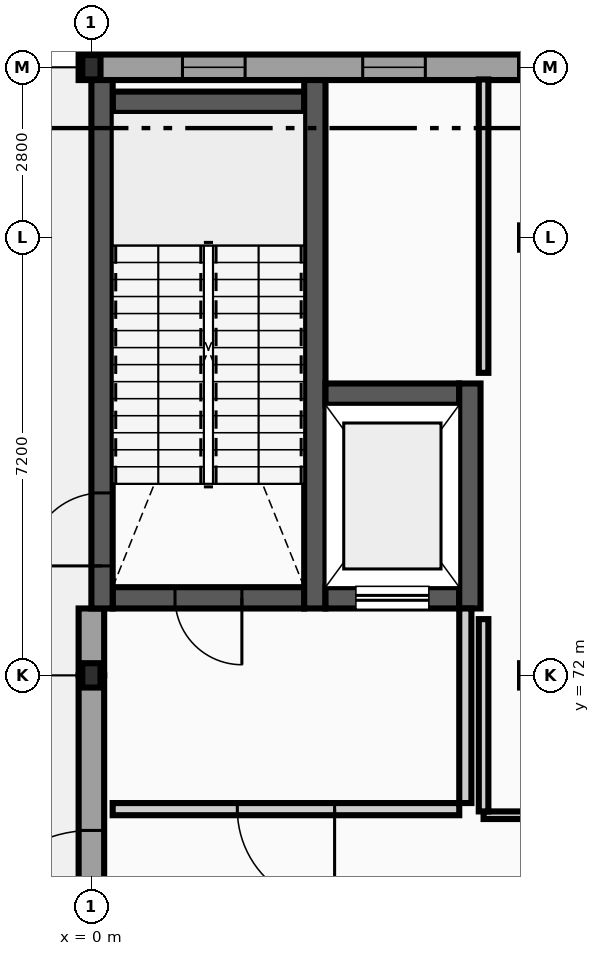
"""IFC4 building model, lengths in metres.
Left out: names, types, materials, properties, quantities, classifications, styles, units other than length and angle.
Written with IfcOpenShell. Run it as: python <this file> out.ifc"""

import sys

from ifc_helpers import new_model, si_unit, direction, frame, frame_2d, origin, origin_2d, place, context, subcontext, project, spatial, rectangle, i_section, extrude, element, fill, save


model = new_model("IFC4")
c1 = context("Model", 3, precision=1e-05, world=origin(), true_north=direction((0.0, 1.0)))
c2 = subcontext(c1, "Body", "Model", "MODEL_VIEW")
j1 = project(units=[si_unit("LENGTHUNIT", "METRE"), si_unit("PLANEANGLEUNIT", "RADIAN")], contexts=[c1])
p1 = place(None, origin())
s1 = spatial("IfcSite", under=j1, at=p1, CompositionType="ELEMENT")
p2 = place(p1, origin())
s2 = spatial("IfcBuilding", under=s1, at=p2, CompositionType="ELEMENT")
p3 = place(p2, origin())
s3 = spatial("IfcBuildingStorey", under=s2, at=p3, CompositionType="ELEMENT", Elevation=0.0)
for number, where, z_axis, x_axis in (
    (1, (0.0, 72.0, 0.0), (0.0, 0.0, 1.0), (1.0, 0.0, 0.0)),
    (2, (0.0, 82.0, 0.0), (0.0, 0.0, 1.0), (1.0, 0.0, 0.0)),
    (3, (7.2, 72.0, 0.0), (0.0, 0.0, 1.0), (1.0, 0.0, 0.0)),
    (4, (7.2, 79.2, 0.0), (0.0, 0.0, 1.0), (1.0, 0.0, 0.0)),
    (5, (7.2, 82.0, 0.0), (0.0, 0.0, 1.0), (1.0, 0.0, 0.0)),
):
    element("IfcColumn", number, at=place(p3, frame(where, z_axis=z_axis, x_axis=x_axis)), inside=s3, PredefinedType="COLUMN", context=c2, shape_type="SweptSolid", body=[
        extrude(i_section(OverallWidth=0.3, OverallDepth=0.4, WebThickness=0.013, FlangeThickness=0.024, FilletRadius=0.027, at=origin_2d()), origin(), (0.0, 0.0, 1.0), 5.2),
    ])
p4 = place(p3, frame((7.2, 82.0, 0.0), z_axis=(0.0, 0.0, 1.0), x_axis=(-1.0, 0.0, 0.0)))
e6 = element("IfcWall", 6, at=p4, inside=s3, PredefinedType="STANDARD", context=c2, shape_type="SweptSolid", body=[
    extrude(rectangle(XDim=7.41, YDim=0.42, at=frame_2d((3.705, 0.0))), origin(), (0.0, 0.0, 1.0), 4.635),
])
p5 = place(p4, frame((1.708, 0.0, 0.95)))
e7 = element("IfcOpeningElement", 7, at=p5, cuts=e6, PredefinedType="OPENING", context=c2, shape_type="SweptSolid", body=[
    extrude(rectangle(XDim=1.03, YDim=1.404, at=frame_2d((0.515, 0.702))), frame((0.0, 0.22, 0.0), z_axis=(0.0, -1.0, 0.0), x_axis=(1.0, 0.0, 0.0)), (0.0, 0.0, 1.0), 0.44),
])
p6 = place(p4, frame((4.672, 0.0, 0.95)))
e8 = element("IfcOpeningElement", 8, at=p6, cuts=e6, PredefinedType="OPENING", context=c2, shape_type="SweptSolid", body=[
    extrude(rectangle(XDim=1.03, YDim=1.404, at=frame_2d((0.515, 0.702))), frame((0.0, 0.22, 0.0), z_axis=(0.0, -1.0, 0.0), x_axis=(1.0, 0.0, 0.0)), (0.0, 0.0, 1.0), 0.44),
])
p7 = place(p3, frame((0.0, 72.0, 0.0), z_axis=(0.0, 0.0, 1.0), x_axis=(0.0, -1.0, 0.0)))
e9 = element("IfcWall", 9, at=p7, inside=s3, PredefinedType="STANDARD", context=c2, shape_type="SweptSolid", body=[
    extrude(rectangle(XDim=7.2, YDim=0.42, at=frame_2d((3.6, 0.0))), origin(), (0.0, 0.0, 1.0), 4.565),
])
p8 = place(p7, frame((2.55, 0.0, 0.0)))
e10 = element("IfcOpeningElement", 10, at=p8, cuts=e9, PredefinedType="OPENING", context=c2, shape_type="SweptSolid", body=[
    extrude(rectangle(XDim=2.1, YDim=2.4, at=frame_2d((1.05, 1.2))), frame((0.0, 0.22, 0.0), z_axis=(0.0, -1.0, 0.0), x_axis=(1.0, 0.0, 0.0)), (0.0, 0.0, 1.0), 0.44),
])
p9 = place(p3, frame((0.0, 73.1, 0.0), z_axis=(0.0, 0.0, 1.0), x_axis=(0.0, -1.0, 0.0)))
e11 = element("IfcWall", 11, at=p9, inside=s3, PredefinedType="STANDARD", context=c2, shape_type="SweptSolid", body=[
    extrude(rectangle(XDim=1.1, YDim=0.42, at=frame_2d((0.55, 0.0))), origin(), (0.0, 0.0, 1.0), 4.94),
])
p10 = place(p3, frame((0.35, 73.275, 0.0), z_axis=(0.0, 0.0, 1.0), x_axis=(1.0, 0.0, 0.0)))
e12 = element("IfcWall", 12, at=p10, inside=s3, PredefinedType="SHEAR", context=c2, shape_type="SweptSolid", body=[
    extrude(rectangle(XDim=3.15, YDim=0.35, at=frame_2d((1.575, 0.0))), origin(), (0.0, 0.0, 1.0), 4.94),
])
p11 = place(p10, frame((1.025, 0.0, 0.0)))
e13 = element("IfcOpeningElement", 13, at=p11, cuts=e12, PredefinedType="OPENING", context=c2, shape_type="SweptSolid", body=[
    extrude(rectangle(XDim=1.1, YDim=2.15, at=frame_2d((0.55, 1.075))), frame((0.0, 0.185, 0.0), z_axis=(0.0, -1.0, 0.0), x_axis=(1.0, 0.0, 0.0)), (0.0, 0.0, 1.0), 0.37),
])
p12 = place(p3, frame((0.35, 81.425, 0.0), z_axis=(0.0, 0.0, 1.0), x_axis=(1.0, 0.0, 0.0)))
e14 = element("IfcWall", 14, at=p12, inside=s3, PredefinedType="SHEAR", context=c2, shape_type="SweptSolid", body=[
    extrude(rectangle(XDim=3.15, YDim=0.35, at=frame_2d((1.575, 0.0))), origin(), (0.0, 0.0, 1.0), 4.94),
])
p13 = place(p3, frame((0.175, 73.1, 0.0), z_axis=(0.0, 0.0, 1.0), x_axis=(0.0, 1.0, 0.0)))
e15 = element("IfcWall", 15, at=p13, inside=s3, PredefinedType="SHEAR", context=c2, shape_type="SweptSolid", body=[
    extrude(rectangle(XDim=8.69, YDim=0.35, at=frame_2d((4.345, 0.0))), origin(), (0.0, 0.0, 1.0), 4.94),
])
p14 = place(p13, frame((0.7, 0.0, 0.0)))
e16 = element("IfcOpeningElement", 16, at=p14, cuts=e15, PredefinedType="OPENING", context=c2, shape_type="SweptSolid", body=[
    extrude(rectangle(XDim=1.2, YDim=2.15, at=frame_2d((0.6, 1.075))), frame((0.0, 0.185, 0.0), z_axis=(0.0, -1.0, 0.0), x_axis=(1.0, 0.0, 0.0)), (0.0, 0.0, 1.0), 0.37),
])
p15 = place(p3, frame((3.675, 73.1, 0.0), z_axis=(0.0, 0.0, 1.0), x_axis=(0.0, 1.0, 0.0)))
e17 = element("IfcWall", 17, at=p15, inside=s3, PredefinedType="SHEAR", context=c2, shape_type="SweptSolid", body=[
    extrude(rectangle(XDim=8.69, YDim=0.35, at=frame_2d((4.345, 0.0))), origin(), (0.0, 0.0, 1.0), 4.94),
])
p16 = place(p3, frame((3.85, 73.275, 0.0), z_axis=(0.0, 0.0, 1.0), x_axis=(1.0, 0.0, 0.0)))
e18 = element("IfcWall", 18, at=p16, inside=s3, PredefinedType="SHEAR", context=c2, shape_type="SweptSolid", body=[
    extrude(rectangle(XDim=2.2, YDim=0.35, at=frame_2d((1.1, 0.0))), origin(), (0.0, 0.0, 1.0), 4.94),
])
p17 = place(p16, frame((0.5, 0.0, 0.0)))
e19 = element("IfcOpeningElement", 19, at=p17, cuts=e18, PredefinedType="OPENING", context=c2, shape_type="SweptSolid", body=[
    extrude(rectangle(XDim=1.2, YDim=2.2, at=frame_2d((0.6, 1.1))), frame((0.0, 0.185, 0.0), z_axis=(0.0, -1.0, 0.0), x_axis=(1.0, 0.0, 0.0)), (0.0, 0.0, 1.0), 0.37),
])
p18 = place(p3, frame((3.85, 76.625, 0.0), z_axis=(0.0, 0.0, 1.0), x_axis=(1.0, 0.0, 0.0)))
e20 = element("IfcWall", 20, at=p18, inside=s3, PredefinedType="SHEAR", context=c2, shape_type="SweptSolid", body=[
    extrude(rectangle(XDim=2.2, YDim=0.35, at=frame_2d((1.1, 0.0))), origin(), (0.0, 0.0, 1.0), 4.94),
])
p19 = place(p3, frame((6.225, 73.1, 0.0), z_axis=(0.0, 0.0, 1.0), x_axis=(0.0, 1.0, 0.0)))
e21 = element("IfcWall", 21, at=p19, inside=s3, PredefinedType="SHEAR", context=c2, shape_type="SweptSolid", body=[
    extrude(rectangle(XDim=3.7, YDim=0.35, at=frame_2d((1.85, 0.0))), origin(), (0.0, 0.0, 1.0), 4.94),
])
p20 = place(p3, frame((0.35, 69.8, 0.0), z_axis=(0.0, 0.0, 1.0), x_axis=(1.0, 0.0, 0.0)))
e22 = element("IfcWall", 22, at=p20, inside=s3, PredefinedType="PARTITIONING", context=c2, shape_type="SweptSolid", body=[
    extrude(rectangle(XDim=5.7, YDim=0.2, at=frame_2d((2.85, 0.0))), origin(), (0.0, 0.0, 1.0), 4.94),
])
p21 = place(p20, frame((2.05, 0.0, 0.0)))
e23 = element("IfcOpeningElement", 23, at=p21, cuts=e22, PredefinedType="OPENING", context=c2, shape_type="SweptSolid", body=[
    extrude(rectangle(XDim=1.6, YDim=2.2, at=frame_2d((0.8, 1.1))), frame((0.0, 0.11, 0.0), z_axis=(0.0, -1.0, 0.0), x_axis=(1.0, 0.0, 0.0)), (0.0, 0.0, 1.0), 0.22),
])
p22 = place(p3, frame((6.15, 69.9, 0.0), z_axis=(0.0, 0.0, 1.0), x_axis=(0.0, 1.0, 0.0)))
e24 = element("IfcWall", 24, at=p22, inside=s3, PredefinedType="PARTITIONING", context=c2, shape_type="SweptSolid", body=[
    extrude(rectangle(XDim=3.2, YDim=0.2, at=frame_2d((1.6, 0.0))), origin(), (0.0, 0.0, 1.0), 4.94),
])
p23 = place(p3, frame((6.45, 69.7, 0.0), z_axis=(0.0, 0.0, 1.0), x_axis=(1.0, 0.0, 0.0)))
e25 = element("IfcWall", 25, at=p23, inside=s3, PredefinedType="PARTITIONING", context=c2, shape_type="SweptSolid", body=[
    extrude(rectangle(XDim=16.18, YDim=0.125, at=frame_2d((8.09, 0.0))), origin(), (0.0, 0.0, 1.0), 4.94),
])
p24 = place(p23, frame((12.35, 0.0, 0.0)))
e26 = element("IfcOpeningElement", 26, at=p24, cuts=e25, PredefinedType="OPENING", context=c2, shape_type="SweptSolid", body=[
    extrude(rectangle(XDim=0.9, YDim=2.1, at=frame_2d((0.45, 1.05))), frame((0.0, 0.073, 0.0), z_axis=(0.0, -1.0, 0.0), x_axis=(1.0, 0.0, 0.0)), (0.0, 0.0, 1.0), 0.145),
])
p25 = place(p23, frame((9.95, 0.0, 0.0)))
e27 = element("IfcOpeningElement", 27, at=p25, cuts=e25, PredefinedType="OPENING", context=c2, shape_type="SweptSolid", body=[
    extrude(rectangle(XDim=1.5, YDim=2.2, at=frame_2d((0.75, 1.1))), frame((0.0, 0.073, 0.0), z_axis=(0.0, -1.0, 0.0), x_axis=(1.0, 0.0, 0.0)), (0.0, 0.0, 1.0), 0.145),
])
p26 = place(p23, frame((2.625, 0.0, 0.0)))
e28 = element("IfcOpeningElement", 28, at=p26, cuts=e25, PredefinedType="OPENING", context=c2, shape_type="SweptSolid", body=[
    extrude(rectangle(XDim=1.5, YDim=2.2, at=frame_2d((0.75, 1.1))), frame((0.0, 0.073, 0.0), z_axis=(0.0, -1.0, 0.0), x_axis=(1.0, 0.0, 0.0)), (0.0, 0.0, 1.0), 0.145),
])
p27 = place(p3, frame((6.45, 69.762, 0.0), z_axis=(0.0, 0.0, 1.0), x_axis=(0.0, 1.0, 0.0)))
e29 = element("IfcWall", 29, at=p27, inside=s3, PredefinedType="PARTITIONING", context=c2, shape_type="SweptSolid", body=[
    extrude(rectangle(XDim=3.163, YDim=0.158, at=frame_2d((1.581, 0.0))), origin(), (0.0, 0.0, 1.0), 4.94),
])
p28 = place(p3, frame((6.45, 76.975, 0.0), z_axis=(0.0, 0.0, 1.0), x_axis=(0.0, 1.0, 0.0)))
e30 = element("IfcWall", 30, at=p28, inside=s3, PredefinedType="PARTITIONING", context=c2, shape_type="SweptSolid", body=[
    extrude(rectangle(XDim=4.825, YDim=0.158, at=frame_2d((2.413, 0.0))), origin(), (0.0, 0.0, 1.0), 4.94),
])
p29 = place(p5, origin())
e31 = element("IfcWindow", 31, at=p29, inside=s3, PartitioningType="SINGLE_PANEL", PredefinedType="WINDOW", context=c2, shape_type="SweptSolid", body=[
    extrude(rectangle(XDim=1.03, YDim=1.404, at=frame_2d((0.515, 0.702))), frame((0.0, 0.03, 0.0), z_axis=(0.0, -1.0, 0.0), x_axis=(1.0, 0.0, 0.0)), (0.0, 0.0, 1.0), 0.06),
])
fill(e7, e31)
p30 = place(p6, origin())
e32 = element("IfcWindow", 32, at=p30, inside=s3, PartitioningType="SINGLE_PANEL", PredefinedType="WINDOW", context=c2, shape_type="SweptSolid", body=[
    extrude(rectangle(XDim=1.03, YDim=1.404, at=frame_2d((0.515, 0.702))), frame((0.0, 0.03, 0.0), z_axis=(0.0, -1.0, 0.0), x_axis=(1.0, 0.0, 0.0)), (0.0, 0.0, 1.0), 0.06),
])
fill(e8, e32)
p31 = place(p8, origin())
e33 = element("IfcDoor", 33, at=p31, inside=s3, OperationType="DOUBLE_DOOR_SINGLE_SWING", PredefinedType="DOOR", context=c2, shape_type="SweptSolid", body=[
    extrude(rectangle(XDim=2.1, YDim=2.4, at=frame_2d((1.05, 1.2))), frame((0.0, 0.025, 0.0), z_axis=(0.0, -1.0, 0.0), x_axis=(1.0, 0.0, 0.0)), (0.0, 0.0, 1.0), 0.05),
])
fill(e10, e33)
p32 = place(p11, origin())
e34 = element("IfcDoor", 34, at=p32, inside=s3, OperationType="SINGLE_SWING_RIGHT", PredefinedType="DOOR", context=c2, shape_type="SweptSolid", body=[
    extrude(rectangle(XDim=1.1, YDim=2.15, at=frame_2d((0.55, 1.075))), frame((0.0, 0.025, 0.0), z_axis=(0.0, -1.0, 0.0), x_axis=(1.0, 0.0, 0.0)), (0.0, 0.0, 1.0), 0.05),
])
fill(e13, e34)
p33 = place(p14, origin())
e35 = element("IfcDoor", 35, at=p33, inside=s3, OperationType="SINGLE_SWING_LEFT", PredefinedType="DOOR", context=c2, shape_type="SweptSolid", body=[
    extrude(rectangle(XDim=1.2, YDim=2.15, at=frame_2d((0.6, 1.075))), frame((0.0, 0.025, 0.0), z_axis=(0.0, -1.0, 0.0), x_axis=(1.0, 0.0, 0.0)), (0.0, 0.0, 1.0), 0.05),
])
fill(e16, e35)
p34 = place(p17, origin())
e36 = element("IfcDoor", 36, at=p34, inside=s3, OperationType="SLIDING_TO_RIGHT", PredefinedType="DOOR", context=c2, shape_type="SweptSolid", body=[
    extrude(rectangle(XDim=1.2, YDim=2.2, at=frame_2d((0.6, 1.1))), frame((0.0, 0.025, 0.0), z_axis=(0.0, -1.0, 0.0), x_axis=(1.0, 0.0, 0.0)), (0.0, 0.0, 1.0), 0.05),
])
fill(e19, e36)
p35 = place(p21, origin())
e37 = element("IfcDoor", 37, at=p35, inside=s3, OperationType="DOUBLE_DOOR_SINGLE_SWING", PredefinedType="DOOR", context=c2, shape_type="SweptSolid", body=[
    extrude(rectangle(XDim=1.6, YDim=2.2, at=frame_2d((0.8, 1.1))), frame((0.0, 0.025, 0.0), z_axis=(0.0, -1.0, 0.0), x_axis=(1.0, 0.0, 0.0)), (0.0, 0.0, 1.0), 0.05),
])
fill(e23, e37)
save(model, sys.argv[1])
